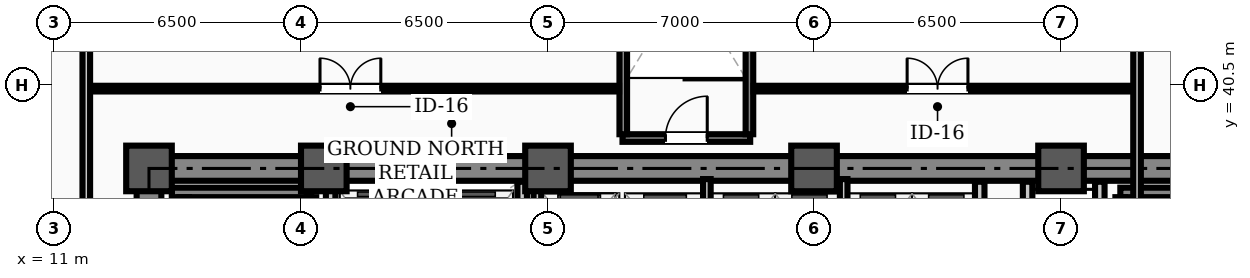
"""IFC4 building model, lengths in metres.
Left out: names, types, materials, properties, quantities, classifications, styles, units other than length and angle.
Written with IfcOpenShell. Run it as: python <this file> out.ifc"""

import sys

from ifc_helpers import new_model, si_unit, direction, frame, frame_2d, origin, origin_2d, place, context, subcontext, project, spatial, rectangle, hollow_rectangle, extrude, element, fill, save


model = new_model("IFC4")
c1 = context("Model", 3, precision=1e-05, world=origin(), true_north=direction((0.0, 1.0)))
c2 = subcontext(c1, "Body", "Model", "MODEL_VIEW")
j1 = project(units=[si_unit("LENGTHUNIT", "METRE"), si_unit("PLANEANGLEUNIT", "RADIAN")], contexts=[c1])
p1 = place(None, origin())
s1 = spatial("IfcSite", under=j1, at=p1, CompositionType="ELEMENT")
p2 = place(p1, origin())
s2 = spatial("IfcBuilding", under=s1, at=p2, CompositionType="ELEMENT")
p3 = place(p2, origin())
s3 = spatial("IfcBuildingStorey", under=s2, at=p3, CompositionType="ELEMENT", Elevation=0.0)
for number, where, z_axis, x_axis in (
    (1, (13.5, 38.3, 0.0), (0.0, 0.0, 1.0), (1.0, 0.0, 0.0)),
    (2, (18.1, 38.3, 0.0), (0.0, 0.0, 1.0), (1.0, 0.0, 0.0)),
    (3, (24.0, 38.3, 0.0), (0.0, 0.0, 1.0), (1.0, 0.0, 0.0)),
    (4, (31.0, 38.3, 0.0), (0.0, 0.0, 1.0), (1.0, 0.0, 0.0)),
    (5, (37.5, 38.3, 0.0), (0.0, 0.0, 1.0), (1.0, 0.0, 0.0)),
):
    element("IfcColumn", number, at=place(p3, frame(where, z_axis=z_axis, x_axis=x_axis)), inside=s3, PredefinedType="COLUMN", context=c2, shape_type="SweptSolid", body=[
        extrude(hollow_rectangle(XDim=1.2, YDim=1.2, WallThickness=0.04, InnerFilletRadius=0.02, OuterFilletRadius=0.06, at=origin_2d()), origin(), (0.0, 0.0, 1.0), 5.8),
    ])
p4 = place(p3, frame((13.5, 38.3, 0.0), z_axis=(0.0, 0.0, 1.0), x_axis=(1.0, 0.0, 0.0)))
e6 = element("IfcWall", 6, at=p4, inside=s3, PredefinedType="SHEAR", context=c2, shape_type="SweptSolid", body=[
    extrude(rectangle(XDim=30.5, YDim=0.65, at=frame_2d((15.25, 0.0))), origin(), (0.0, 0.0, 1.0), 5.55),
])
p5 = place(p3, frame((13.5, 29.35, 0.0), z_axis=(0.0, 0.0, 1.0), x_axis=(0.0, 1.0, 0.0)))
e7 = element("IfcWall", 7, at=p5, inside=s3, PredefinedType="SHEAR", context=c2, shape_type="SweptSolid", body=[
    extrude(rectangle(XDim=8.6, YDim=0.65, at=frame_2d((4.3, 0.0))), origin(), (0.0, 0.0, 1.0), 5.55),
])
p6 = place(p3, frame((14.1, 37.669, 0.0), z_axis=(0.0, 0.0, 1.0), x_axis=(1.0, 0.0, 0.0)))
e8 = element("IfcWall", 8, at=p6, inside=s3, PredefinedType="STANDARD", context=c2, shape_type="SweptSolid", body=[
    extrude(rectangle(XDim=3.67, YDim=0.25, at=frame_2d((1.835, 0.0))), origin(), (0.0, 0.0, 1.0), 5.55),
])
for number, where, z_axis, x_axis in (
    (9, (14.425, 30.36, 0.0), (0.0, 0.0, 1.0), (0.0, 1.0, 0.0)),
    (10, (17.775, 30.36, 0.0), (0.0, 0.0, 1.0), (0.0, 1.0, 0.0)),
):
    element("IfcWall", number, at=place(p3, frame(where, z_axis=z_axis, x_axis=x_axis)), inside=s3, PredefinedType="STANDARD", context=c2, shape_type="SweptSolid", body=[
        extrude(rectangle(XDim=7.184, YDim=0.25, at=frame_2d((3.592, 0.0))), origin(), (0.0, 0.0, 1.0), 5.55),
    ])
p7 = place(p3, frame((39.06, 37.669, 0.0), z_axis=(0.0, 0.0, 1.0), x_axis=(1.0, 0.0, 0.0)))
e11 = element("IfcWall", 11, at=p7, inside=s3, PredefinedType="STANDARD", context=c2, shape_type="SweptSolid", body=[
    extrude(rectangle(XDim=3.34, YDim=0.25, at=frame_2d((1.67, 0.0))), origin(), (0.0, 0.0, 1.0), 5.55),
])
p8 = place(p3, frame((39.055, 30.36, 0.0), z_axis=(0.0, 0.0, 1.0), x_axis=(0.0, 1.0, 0.0)))
e12 = element("IfcWall", 12, at=p8, inside=s3, PredefinedType="STANDARD", context=c2, shape_type="SweptSolid", body=[
    extrude(rectangle(XDim=7.184, YDim=0.25, at=frame_2d((3.592, 0.0))), origin(), (0.0, 0.0, 1.0), 5.55),
])
p9 = place(p3, frame((36.62, 31.95, 0.0), z_axis=(0.0, 0.0, 1.0), x_axis=(0.0, 1.0, 0.0)))
e13 = element("IfcWall", 13, at=p9, inside=s3, PredefinedType="STANDARD", context=c2, shape_type="SweptSolid", body=[
    extrude(rectangle(XDim=6.0, YDim=0.25, at=frame_2d((3.0, 0.0))), origin(), (0.0, 0.0, 1.0), 4.73),
])
p10 = place(p9, frame((0.9, 0.0, 0.0)))
e14 = element("IfcOpeningElement", 14, at=p10, cuts=e13, PredefinedType="OPENING", context=c2, shape_type="SweptSolid", body=[
    extrude(rectangle(XDim=1.1, YDim=2.08, at=frame_2d((0.55, 1.04))), frame((0.0, 0.135, 0.0), z_axis=(0.0, -1.0, 0.0), x_axis=(1.0, 0.0, 0.0)), (0.0, 0.0, 1.0), 0.27),
])
p11 = place(p9, frame((4.0, 0.0, 0.0)))
e15 = element("IfcOpeningElement", 15, at=p11, cuts=e13, PredefinedType="OPENING", context=c2, shape_type="SweptSolid", body=[
    extrude(rectangle(XDim=1.1, YDim=2.08, at=frame_2d((0.55, 1.04))), frame((0.0, 0.135, 0.0), z_axis=(0.0, -1.0, 0.0), x_axis=(1.0, 0.0, 0.0)), (0.0, 0.0, 1.0), 0.27),
])
p12 = place(p3, frame((38.52, 31.95, 0.0), z_axis=(0.0, 0.0, 1.0), x_axis=(0.0, 1.0, 0.0)))
e16 = element("IfcWall", 16, at=p12, inside=s3, PredefinedType="STANDARD", context=c2, shape_type="SweptSolid", body=[
    extrude(rectangle(XDim=6.0, YDim=0.25, at=frame_2d((3.0, 0.0))), origin(), (0.0, 0.0, 1.0), 4.73),
])
for number, where, z_axis, x_axis in (
    (17, (18.28, 34.62, 0.0), (0.0, 0.0, 1.0), (0.0, 1.0, 0.0)),
    (18, (23.32, 34.62, 0.0), (0.0, 0.0, 1.0), (0.0, 1.0, 0.0)),
):
    element("IfcWall", number, at=place(p3, frame(where, z_axis=z_axis, x_axis=x_axis)), inside=s3, PredefinedType="STANDARD", context=c2, shape_type="SweptSolid", body=[
        extrude(rectangle(XDim=3.33, YDim=0.25, at=frame_2d((1.665, 0.0))), origin(), (0.0, 0.0, 1.0), 4.73),
    ])
p13 = place(p3, frame((35.36, 34.9, 0.0), z_axis=(0.0, 0.0, 1.0), x_axis=(0.0, 1.0, 0.0)))
e19 = element("IfcWall", 19, at=p13, inside=s3, PredefinedType="STANDARD", context=c2, shape_type="SweptSolid", body=[
    extrude(rectangle(XDim=3.05, YDim=0.25, at=frame_2d((1.525, 0.0))), origin(), (0.0, 0.0, 1.0), 4.73),
])
p14 = place(p3, frame((25.96, 39.1, 0.0), z_axis=(0.0, 0.0, 1.0), x_axis=(1.0, 0.0, 0.0)))
e20 = element("IfcWall", 20, at=p14, inside=s3, PredefinedType="STANDARD", context=c2, shape_type="SweptSolid", body=[
    extrude(rectangle(XDim=3.36, YDim=0.2, at=frame_2d((1.68, 0.0))), origin(), (0.0, 0.0, 1.0), 5.55),
])
p15 = place(p14, frame((1.13, 0.0, 0.0)))
e21 = element("IfcOpeningElement", 21, at=p15, cuts=e20, PredefinedType="OPENING", context=c2, shape_type="SweptSolid", body=[
    extrude(rectangle(XDim=1.1, YDim=2.08, at=frame_2d((0.55, 1.04))), frame((0.0, 0.11, 0.0), z_axis=(0.0, -1.0, 0.0), x_axis=(1.0, 0.0, 0.0)), (0.0, 0.0, 1.0), 0.22),
])
for number, where, z_axis, x_axis in (
    (22, (25.98, 39.2, 0.0), (0.0, 0.0, 1.0), (0.0, 1.0, 0.0)),
    (23, (29.3, 39.2, 0.0), (0.0, 0.0, 1.0), (0.0, 1.0, 0.0)),
):
    element("IfcWall", number, at=place(p3, frame(where, z_axis=z_axis, x_axis=x_axis)), inside=s3, PredefinedType="STANDARD", context=c2, shape_type="SweptSolid", body=[
        extrude(rectangle(XDim=6.58, YDim=0.2, at=frame_2d((3.29, 0.0))), origin(), (0.0, 0.0, 1.0), 5.55),
    ])
p16 = place(p3, frame((11.85, 40.4, 0.0), z_axis=(0.0, 0.0, 1.0), x_axis=(1.0, 0.0, 0.0)))
e24 = element("IfcWall", 24, at=p16, inside=s3, PredefinedType="PARTITIONING", context=c2, shape_type="SweptSolid", body=[
    extrude(rectangle(XDim=14.02, YDim=0.15, at=frame_2d((7.01, 0.0))), origin(), (0.0, 0.0, 1.0), 4.83),
])
p17 = place(p16, frame((6.15, 0.0, 0.0)))
e25 = element("IfcOpeningElement", 25, at=p17, cuts=e24, PredefinedType="OPENING", context=c2, shape_type="SweptSolid", body=[
    extrude(rectangle(XDim=1.6, YDim=2.08, at=frame_2d((0.8, 1.04))), frame((0.0, 0.085, 0.0), z_axis=(0.0, -1.0, 0.0), x_axis=(1.0, 0.0, 0.0)), (0.0, 0.0, 1.0), 0.17),
])
p18 = place(p3, frame((29.41, 40.4, 0.0), z_axis=(0.0, 0.0, 1.0), x_axis=(1.0, 0.0, 0.0)))
e26 = element("IfcWall", 26, at=p18, inside=s3, PredefinedType="PARTITIONING", context=c2, shape_type="SweptSolid", body=[
    extrude(rectangle(XDim=10.09, YDim=0.15, at=frame_2d((5.045, 0.0))), origin(), (0.0, 0.0, 1.0), 4.83),
])
p19 = place(p18, frame((4.04, 0.0, 0.0)))
e27 = element("IfcOpeningElement", 27, at=p19, cuts=e26, PredefinedType="OPENING", context=c2, shape_type="SweptSolid", body=[
    extrude(rectangle(XDim=1.6, YDim=2.08, at=frame_2d((0.8, 1.04))), frame((0.0, 0.085, 0.0), z_axis=(0.0, -1.0, 0.0), x_axis=(1.0, 0.0, 0.0)), (0.0, 0.0, 1.0), 0.17),
])
p20 = place(p3, frame((11.85, 36.86, 0.0), z_axis=(0.0, 0.0, 1.0), x_axis=(0.0, 1.0, 0.0)))
e28 = element("IfcWall", 28, at=p20, inside=s3, PredefinedType="STANDARD", context=c2, shape_type="SweptSolid", body=[
    extrude(rectangle(XDim=14.17, YDim=0.2, at=frame_2d((7.085, 0.0))), origin(), (0.0, 0.0, 1.0), 4.73),
])
p21 = place(p3, frame((39.5, 35.41, 0.0), z_axis=(0.0, 0.0, 1.0), x_axis=(0.0, 1.0, 0.0)))
e29 = element("IfcWall", 29, at=p21, inside=s3, PredefinedType="STANDARD", context=c2, shape_type="SweptSolid", body=[
    extrude(rectangle(XDim=15.62, YDim=0.2, at=frame_2d((7.81, 0.0))), origin(), (0.0, 0.0, 1.0), 4.73),
])
for number, where, z_axis, x_axis in (
    (30, (23.72, 34.9, 0.0), (0.0, 0.0, 1.0), (0.0, 1.0, 0.0)),
    (31, (28.18, 34.9, 0.0), (0.0, 0.0, 1.0), (0.0, 1.0, 0.0)),
    (32, (31.78, 34.9, 0.0), (0.0, 0.0, 1.0), (0.0, 1.0, 0.0)),
):
    element("IfcWall", number, at=place(p3, frame(where, z_axis=z_axis, x_axis=x_axis)), inside=s3, PredefinedType="STANDARD", context=c2, shape_type="SweptSolid", body=[
        extrude(rectangle(XDim=3.12, YDim=0.2, at=frame_2d((1.56, 0.0))), origin(), (0.0, 0.0, 1.0), 4.73),
    ])
p22 = place(p15, origin())
e33 = element("IfcDoor", 33, at=p22, inside=s3, OperationType="SINGLE_SWING_RIGHT", PredefinedType="DOOR", context=c2, shape_type="SweptSolid", body=[
    extrude(rectangle(XDim=1.1, YDim=2.08, at=frame_2d((0.55, 1.04))), frame((0.0, 0.025, 0.0), z_axis=(0.0, -1.0, 0.0), x_axis=(1.0, 0.0, 0.0)), (0.0, 0.0, 1.0), 0.05),
])
fill(e21, e33)
p23 = place(p17, origin())
e34 = element("IfcDoor", 34, at=p23, inside=s3, OperationType="DOUBLE_DOOR_SINGLE_SWING", PredefinedType="DOOR", context=c2, shape_type="SweptSolid", body=[
    extrude(rectangle(XDim=1.6, YDim=2.08, at=frame_2d((0.8, 1.04))), frame((0.0, 0.025, 0.0), z_axis=(0.0, -1.0, 0.0), x_axis=(1.0, 0.0, 0.0)), (0.0, 0.0, 1.0), 0.05),
])
fill(e25, e34)
p24 = place(p19, origin())
e35 = element("IfcDoor", 35, at=p24, inside=s3, OperationType="DOUBLE_DOOR_SINGLE_SWING", PredefinedType="DOOR", context=c2, shape_type="SweptSolid", body=[
    extrude(rectangle(XDim=1.6, YDim=2.08, at=frame_2d((0.8, 1.04))), frame((0.0, 0.025, 0.0), z_axis=(0.0, -1.0, 0.0), x_axis=(1.0, 0.0, 0.0)), (0.0, 0.0, 1.0), 0.05),
])
fill(e27, e35)
save(model, sys.argv[1])
